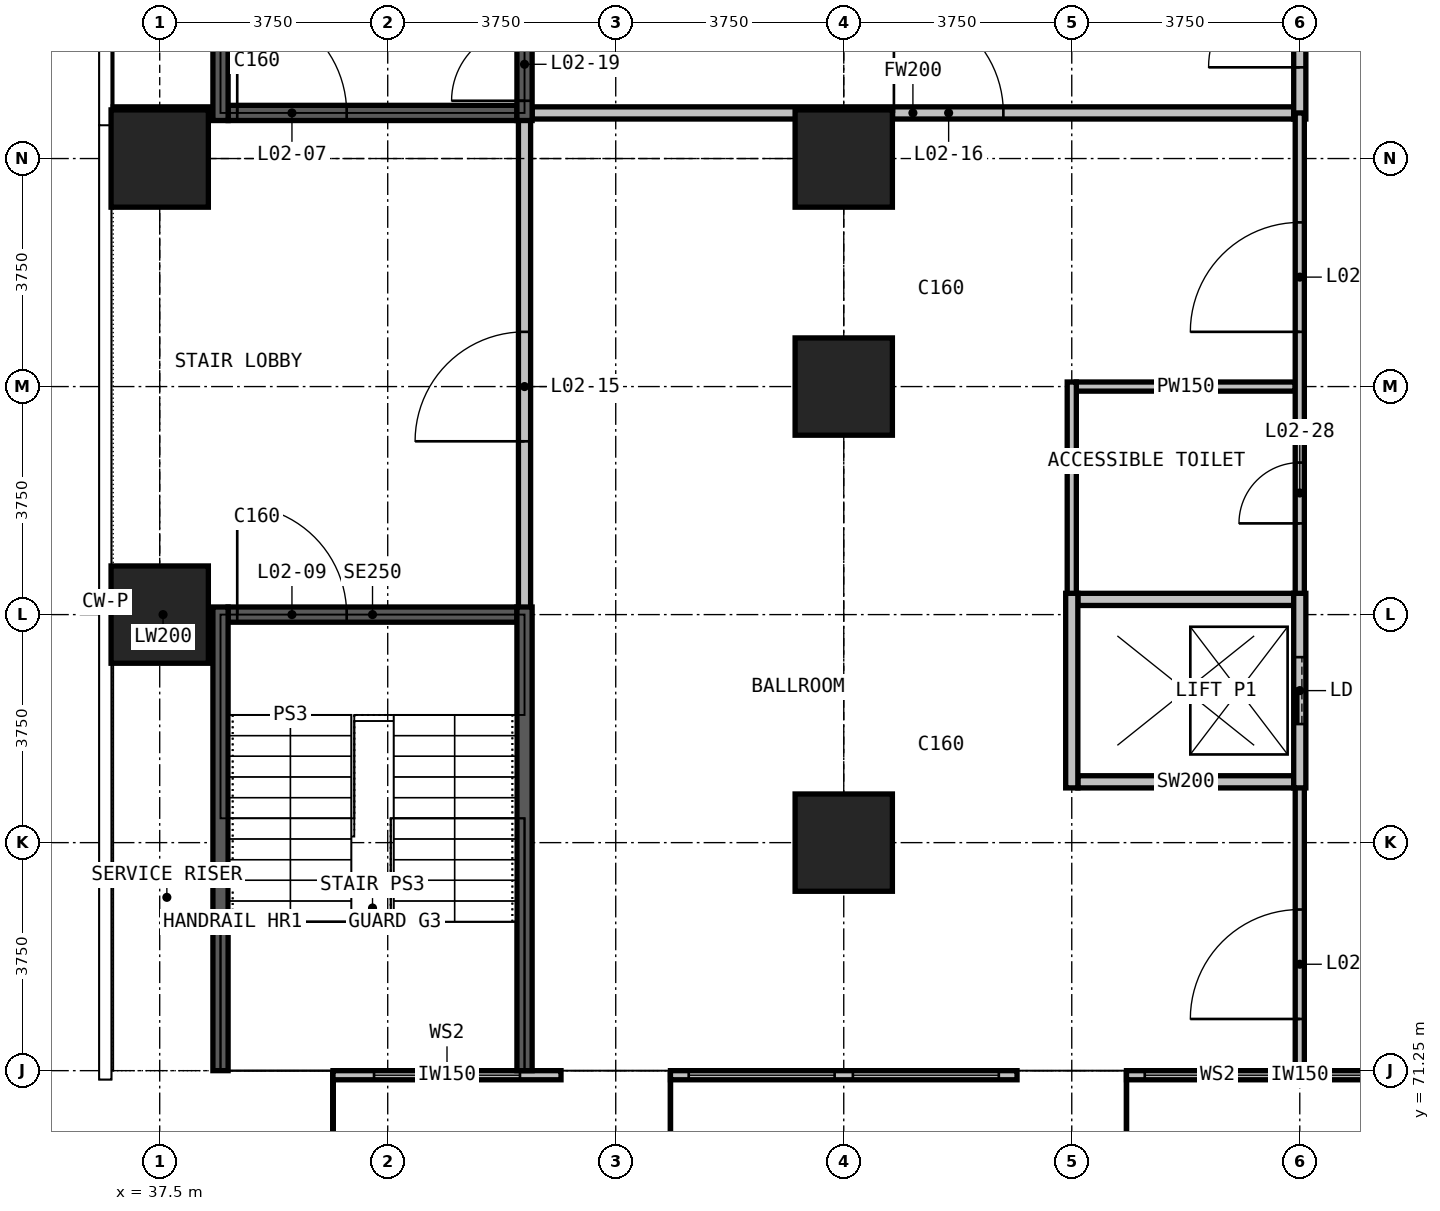
"""IFC4 building model, lengths in metres.
Left out: names, types, materials, properties, quantities, classifications, styles, units other than length and angle.
Written with IfcOpenShell. Run it as: python <this file> out.ifc"""

import sys

from ifc_helpers import new_model, si_unit, direction, frame, frame_2d, origin, origin_2d, place, context, subcontext, project, spatial, polyline, rectangle, outline, extrude, element, fill, save


model = new_model("IFC4")
c1 = context("Model", 3, precision=1e-05, world=origin(), true_north=direction((0.0, 1.0)))
c2 = subcontext(c1, "Body", "Model", "MODEL_VIEW")
j1 = project(units=[si_unit("LENGTHUNIT", "METRE"), si_unit("PLANEANGLEUNIT", "RADIAN")], contexts=[c1])
p1 = place(None, origin())
s1 = spatial("IfcSite", under=j1, at=p1, CompositionType="ELEMENT")
p2 = place(p1, origin())
s2 = spatial("IfcBuilding", under=s1, at=p2, CompositionType="ELEMENT")
p3 = place(p2, frame((0.0, 0.0, 16.5)))
s3 = spatial("IfcBuildingStorey", under=s2, at=p3, CompositionType="ELEMENT", Elevation=16.5)
p4 = place(p3, frame((40.35, 62.22, 0.0), z_axis=(1.0, 0.0, 0.0), x_axis=(0.0, 1.0, 0.0)))
e1 = element("IfcWall", 1, at=p4, inside=s3, PredefinedType="SHEAR", context=c2, shape_type="SweptSolid", body=[
    extrude(outline(polyline([(0.0, 0.0), (9.03, 0.0), (9.03, 7.5), (5.28, 7.5), (5.28, 7.15), (-17.22, 7.15), (-17.22, 7.5), (-20.97, 7.5), (-20.97, 0.0), (-11.941, 0.0), (-11.595, 0.488), (-10.658, 1.607), (-9.72, 2.522), (-8.783, 3.234), (-7.845, 3.743), (-6.908, 4.048), (-5.97, 4.15), (-5.033, 4.048), (-4.095, 3.743), (-3.158, 3.234), (-2.22, 2.522), (-1.283, 1.607), (-0.345, 0.488), (0.0, 0.0)])), origin(), (0.0, 0.0, -1.0), 3.75),
])
for number, where, z_axis, x_axis in (
    (2, (45.9, 62.22, 0.0), (1.0, 0.0, 0.0), (0.0, 1.0, 0.0)),
    (3, (53.4, 62.22, 0.0), (1.0, 0.0, 0.0), (0.0, 1.0, 0.0)),
):
    element("IfcWall", number, at=place(p3, frame(where, z_axis=z_axis, x_axis=x_axis)), inside=s3, PredefinedType="SHEAR", context=c2, shape_type="SweptSolid", body=[
        extrude(outline(polyline([(0.0, 0.0), (9.03, 0.0), (9.03, 7.5), (5.28, 7.5), (5.28, 7.15), (-17.22, 7.15), (-17.22, 7.5), (-20.97, 7.5), (-20.97, 0.0), (-11.941, 0.0), (-11.595, 0.488), (-10.658, 1.607), (-9.72, 2.522), (-8.783, 3.234), (-7.845, 3.743), (-6.908, 4.048), (-5.97, 4.15), (-5.033, 4.048), (-4.095, 3.743), (-3.158, 3.234), (-2.22, 2.522), (-1.283, 1.607), (-0.345, 0.488), (0.0, 0.0)])), origin(), (0.0, 0.0, -1.0), 1.8),
    ])
for number, where, z_axis, x_axis in (
    (4, (37.5, 78.75, 0.0), (0.0, 0.0, 1.0), (1.0, 0.0, 0.0)),
    (5, (37.5, 86.25, 0.0), (0.0, 0.0, 1.0), (1.0, 0.0, 0.0)),
    (6, (48.75, 75.0, 0.0), (0.0, 0.0, 1.0), (1.0, 0.0, 0.0)),
    (7, (48.75, 82.5, 0.0), (0.0, 0.0, 1.0), (1.0, 0.0, 0.0)),
    (8, (48.75, 86.25, 0.0), (0.0, 0.0, 1.0), (1.0, 0.0, 0.0)),
):
    element("IfcColumn", number, at=place(p3, frame(where, z_axis=z_axis, x_axis=x_axis)), inside=s3, PredefinedType="COLUMN", context=c2, shape_type="SweptSolid", body=[
        extrude(rectangle(XDim=1.6, YDim=1.6, at=origin_2d()), origin(), (0.0, 0.0, 1.0), 7.5),
    ])
p5 = place(p3, frame((40.35, 71.175, 0.0), z_axis=(0.0, 0.0, 1.0), x_axis=(1.0, 0.0, 0.0)))
e9 = element("IfcWall", 9, at=p5, inside=s3, PredefinedType="SOLIDWALL", context=c2, shape_type="SweptSolid", body=[
    extrude(rectangle(XDim=3.75, YDim=0.15, at=frame_2d((1.875, 0.0))), origin(), (0.0, 0.0, 1.0), 7.15),
])
p6 = place(p5, frame((0.675, 0.0, 0.9)))
e10 = element("IfcOpeningElement", 10, at=p6, cuts=e9, PredefinedType="OPENING", context=c2, shape_type="SweptSolid", body=[
    extrude(rectangle(XDim=2.4, YDim=3.6, at=frame_2d((1.2, 1.8))), frame((0.0, 0.085, 0.0), z_axis=(0.0, -1.0, 0.0), x_axis=(1.0, 0.0, 0.0)), (0.0, 0.0, 1.0), 0.17),
])
p7 = place(p3, frame((45.9, 71.175, 0.0), z_axis=(0.0, 0.0, 1.0), x_axis=(1.0, 0.0, 0.0)))
e11 = element("IfcWall", 11, at=p7, inside=s3, PredefinedType="SOLIDWALL", context=c2, shape_type="SweptSolid", body=[
    extrude(rectangle(XDim=5.7, YDim=0.15, at=frame_2d((2.85, 0.0))), origin(), (0.0, 0.0, 1.0), 7.15),
])
p8 = place(p7, frame((0.3, 0.0, 0.9)))
e12 = element("IfcOpeningElement", 12, at=p8, cuts=e11, PredefinedType="OPENING", context=c2, shape_type="SweptSolid", body=[
    extrude(rectangle(XDim=2.4, YDim=3.6, at=frame_2d((1.2, 1.8))), frame((0.0, 0.085, 0.0), z_axis=(0.0, -1.0, 0.0), x_axis=(1.0, 0.0, 0.0)), (0.0, 0.0, 1.0), 0.17),
])
p9 = place(p7, frame((3.0, 0.0, 0.9)))
e13 = element("IfcOpeningElement", 13, at=p9, cuts=e11, PredefinedType="OPENING", context=c2, shape_type="SweptSolid", body=[
    extrude(rectangle(XDim=2.4, YDim=3.6, at=frame_2d((1.2, 1.8))), frame((0.0, 0.085, 0.0), z_axis=(0.0, -1.0, 0.0), x_axis=(1.0, 0.0, 0.0)), (0.0, 0.0, 1.0), 0.17),
])
p10 = place(p3, frame((53.4, 71.175, 0.0), z_axis=(0.0, 0.0, 1.0), x_axis=(1.0, 0.0, 0.0)))
e14 = element("IfcWall", 14, at=p10, inside=s3, PredefinedType="SOLIDWALL", context=c2, shape_type="SweptSolid", body=[
    extrude(rectangle(XDim=5.7, YDim=0.15, at=frame_2d((2.85, 0.0))), origin(), (0.0, 0.0, 1.0), 7.15),
])
p11 = place(p10, frame((0.3, 0.0, 0.9)))
e15 = element("IfcOpeningElement", 15, at=p11, cuts=e14, PredefinedType="OPENING", context=c2, shape_type="SweptSolid", body=[
    extrude(rectangle(XDim=2.4, YDim=3.6, at=frame_2d((1.2, 1.8))), frame((0.0, 0.085, 0.0), z_axis=(0.0, -1.0, 0.0), x_axis=(1.0, 0.0, 0.0)), (0.0, 0.0, 1.0), 0.17),
])
p12 = place(p10, frame((3.0, 0.0, 0.9)))
e16 = element("IfcOpeningElement", 16, at=p12, cuts=e14, PredefinedType="OPENING", context=c2, shape_type="SweptSolid", body=[
    extrude(rectangle(XDim=2.4, YDim=3.6, at=frame_2d((1.2, 1.8))), frame((0.0, 0.085, 0.0), z_axis=(0.0, -1.0, 0.0), x_axis=(1.0, 0.0, 0.0)), (0.0, 0.0, 1.0), 0.17),
])
for number, where, z_axis, x_axis in (
    (17, (36.735, 78.75, 0.0), (0.0, 0.0, 1.0), (1.0, 0.0, 0.0)),
    (18, (36.735, 87.0, 0.0), (0.0, 0.0, 1.0), (1.0, 0.0, 0.0)),
):
    element("IfcWall", number, at=place(p3, frame(where, z_axis=z_axis, x_axis=x_axis)), inside=s3, PredefinedType="PARTITIONING", context=c2, shape_type="SweptSolid", body=[
        extrude(rectangle(XDim=1.64, YDim=0.2, at=frame_2d((0.82, 0.0))), origin(), (0.0, 0.0, 1.0), 7.15),
    ])
p13 = place(p3, frame((43.5, 78.625, 0.0), z_axis=(0.0, 0.0, 1.0), x_axis=(0.0, 1.0, 0.0)))
e19 = element("IfcWall", 19, at=p13, inside=s3, PredefinedType="PARTITIONING", context=c2, shape_type="SweptSolid", body=[
    extrude(rectangle(XDim=8.5, YDim=0.2, at=frame_2d((4.25, 0.0))), origin(), (0.0, 0.0, 1.0), 7.15),
])
p14 = place(p13, frame((2.975, 0.0, 0.0)))
e20 = element("IfcOpeningElement", 20, at=p14, cuts=e19, PredefinedType="OPENING", context=c2, shape_type="SweptSolid", body=[
    extrude(rectangle(XDim=1.8, YDim=2.2, at=frame_2d((0.9, 1.1))), frame((0.0, 0.11, 0.0), z_axis=(0.0, -1.0, 0.0), x_axis=(1.0, 0.0, 0.0)), (0.0, 0.0, 1.0), 0.22),
])
p15 = place(p3, frame((43.625, 87.0, 0.0), z_axis=(0.0, 0.0, 1.0), x_axis=(1.0, 0.0, 0.0)))
e21 = element("IfcWall", 21, at=p15, inside=s3, PredefinedType="PARTITIONING", context=c2, shape_type="SweptSolid", body=[
    extrude(rectangle(XDim=12.525, YDim=0.2, at=frame_2d((6.262, 0.0))), origin(), (0.0, 0.0, 1.0), 7.15),
])
p16 = place(p15, frame((5.95, 0.0, 0.0)))
e22 = element("IfcOpeningElement", 22, at=p16, cuts=e21, PredefinedType="OPENING", context=c2, shape_type="SweptSolid", body=[
    extrude(rectangle(XDim=1.8, YDim=2.2, at=frame_2d((0.9, 1.1))), frame((0.0, 0.11, 0.0), z_axis=(0.0, -1.0, 0.0), x_axis=(1.0, 0.0, 0.0)), (0.0, 0.0, 1.0), 0.22),
])
p17 = place(p3, frame((56.25, 86.9, 0.0), z_axis=(0.0, 0.0, 1.0), x_axis=(0.0, 1.0, 0.0)))
e23 = element("IfcWall", 23, at=p17, inside=s3, PredefinedType="PARTITIONING", context=c2, shape_type="SweptSolid", body=[
    extrude(rectangle(XDim=3.2, YDim=0.2, at=frame_2d((1.6, 0.0))), origin(), (0.0, 0.0, 1.0), 7.15),
])
p18 = place(p17, frame((0.85, 0.0, 0.0)))
e24 = element("IfcOpeningElement", 24, at=p18, cuts=e23, PredefinedType="OPENING", context=c2, shape_type="SweptSolid", body=[
    extrude(rectangle(XDim=1.5, YDim=2.2, at=frame_2d((0.75, 1.1))), frame((0.0, 0.11, 0.0), z_axis=(0.0, -1.0, 0.0), x_axis=(1.0, 0.0, 0.0)), (0.0, 0.0, 1.0), 0.22),
])
p19 = place(p3, frame((52.575, 82.5, 0.0), z_axis=(0.0, 0.0, 1.0), x_axis=(1.0, 0.0, 0.0)))
e25 = element("IfcWall", 25, at=p19, inside=s3, PredefinedType="PARTITIONING", context=c2, shape_type="SweptSolid", body=[
    extrude(rectangle(XDim=3.6, YDim=0.15, at=frame_2d((1.8, 0.0))), origin(), (0.0, 0.0, 1.0), 7.15),
])
p20 = place(p3, frame((52.5, 78.9, 0.0), z_axis=(0.0, 0.0, 1.0), x_axis=(0.0, 1.0, 0.0)))
e26 = element("IfcWall", 26, at=p20, inside=s3, PredefinedType="PARTITIONING", context=c2, shape_type="SweptSolid", body=[
    extrude(rectangle(XDim=3.675, YDim=0.15, at=frame_2d((1.837, 0.0))), origin(), (0.0, 0.0, 1.0), 7.15),
])
p21 = place(p3, frame((56.25, 71.25, 0.0), z_axis=(0.0, 0.0, 1.0), x_axis=(0.0, 1.0, 0.0)))
e27 = element("IfcWall", 27, at=p21, inside=s3, PredefinedType="PARTITIONING", context=c2, shape_type="SweptSolid", body=[
    extrude(rectangle(XDim=4.85, YDim=0.15, at=frame_2d((2.425, 0.0))), origin(), (0.0, 0.0, 1.0), 7.15),
])
p22 = place(p21, frame((0.85, 0.0, 0.0)))
e28 = element("IfcOpeningElement", 28, at=p22, cuts=e27, PredefinedType="OPENING", context=c2, shape_type="SweptSolid", body=[
    extrude(rectangle(XDim=1.8, YDim=2.2, at=frame_2d((0.9, 1.1))), frame((0.0, 0.085, 0.0), z_axis=(0.0, -1.0, 0.0), x_axis=(1.0, 0.0, 0.0)), (0.0, 0.0, 1.0), 0.17),
])
p23 = place(p3, frame((56.25, 78.9, 0.0), z_axis=(0.0, 0.0, 1.0), x_axis=(0.0, 1.0, 0.0)))
e29 = element("IfcWall", 29, at=p23, inside=s3, PredefinedType="PARTITIONING", context=c2, shape_type="SweptSolid", body=[
    extrude(rectangle(XDim=8.1, YDim=0.15, at=frame_2d((4.05, 0.0))), origin(), (0.0, 0.0, 1.0), 7.15),
])
p24 = place(p23, frame((4.5, 0.0, 0.0)))
e30 = element("IfcOpeningElement", 30, at=p24, cuts=e29, PredefinedType="OPENING", context=c2, shape_type="SweptSolid", body=[
    extrude(rectangle(XDim=1.8, YDim=2.2, at=frame_2d((0.9, 1.1))), frame((0.0, 0.085, 0.0), z_axis=(0.0, -1.0, 0.0), x_axis=(1.0, 0.0, 0.0)), (0.0, 0.0, 1.0), 0.17),
])
p25 = place(p23, frame((1.35, 0.0, 0.0)))
e31 = element("IfcOpeningElement", 31, at=p25, cuts=e29, PredefinedType="OPENING", context=c2, shape_type="SweptSolid", body=[
    extrude(rectangle(XDim=1.0, YDim=2.2, at=frame_2d((0.5, 1.1))), frame((0.0, 0.085, 0.0), z_axis=(0.0, -1.0, 0.0), x_axis=(1.0, 0.0, 0.0)), (0.0, 0.0, 1.0), 0.17),
])
for number, where, z_axis, x_axis in (
    (32, (52.6, 76.0, 0.0), (0.0, 0.0, 1.0), (1.0, 0.0, 0.0)),
    (33, (52.6, 79.0, 0.0), (0.0, 0.0, 1.0), (1.0, 0.0, 0.0)),
):
    element("IfcWall", number, at=place(p3, frame(where, z_axis=z_axis, x_axis=x_axis)), inside=s3, PredefinedType="PARTITIONING", context=c2, shape_type="SweptSolid", body=[
        extrude(rectangle(XDim=3.55, YDim=0.2, at=frame_2d((1.775, 0.0))), origin(), (0.0, 0.0, 1.0), 7.15),
    ])
p26 = place(p3, frame((52.5, 75.9, 0.0), z_axis=(0.0, 0.0, 1.0), x_axis=(0.0, 1.0, 0.0)))
e34 = element("IfcWall", 34, at=p26, inside=s3, PredefinedType="PARTITIONING", context=c2, shape_type="SweptSolid", body=[
    extrude(rectangle(XDim=3.2, YDim=0.2, at=frame_2d((1.6, 0.0))), origin(), (0.0, 0.0, 1.0), 7.15),
])
p27 = place(p3, frame((56.25, 75.9, 0.0), z_axis=(0.0, 0.0, 1.0), x_axis=(0.0, 1.0, 0.0)))
e35 = element("IfcWall", 35, at=p27, inside=s3, PredefinedType="PARTITIONING", context=c2, shape_type="SweptSolid", body=[
    extrude(rectangle(XDim=3.2, YDim=0.2, at=frame_2d((1.6, 0.0))), origin(), (0.0, 0.0, 1.0), 7.15),
])
p28 = place(p27, frame((1.05, 0.0, 0.0)))
e36 = element("IfcOpeningElement", 36, at=p28, cuts=e35, PredefinedType="OPENING", context=c2, shape_type="SweptSolid", body=[
    extrude(rectangle(XDim=1.1, YDim=2.2, at=frame_2d((0.55, 1.1))), frame((0.0, 0.11, 0.0), z_axis=(0.0, -1.0, 0.0), x_axis=(1.0, 0.0, 0.0)), (0.0, 0.0, 1.0), 0.22),
])
p29 = place(p3, frame((38.625, 78.75, 0.0), z_axis=(0.0, 0.0, 1.0), x_axis=(1.0, 0.0, 0.0)))
e37 = element("IfcWall", 37, at=p29, inside=s3, PredefinedType="PARTITIONING", context=c2, shape_type="SweptSolid", body=[
    extrude(rectangle(XDim=4.75, YDim=0.25, at=frame_2d((2.375, 0.0))), origin(), (0.0, 0.0, 1.0), 7.15),
])
p30 = place(p29, frame((0.15, 0.0, 0.0)))
e38 = element("IfcOpeningElement", 38, at=p30, cuts=e37, PredefinedType="OPENING", context=c2, shape_type="SweptSolid", body=[
    extrude(rectangle(XDim=1.8, YDim=2.2, at=frame_2d((0.9, 1.1))), frame((0.0, 0.135, 0.0), z_axis=(0.0, -1.0, 0.0), x_axis=(1.0, 0.0, 0.0)), (0.0, 0.0, 1.0), 0.27),
])
p31 = place(p3, frame((38.625, 87.0, 0.0), z_axis=(0.0, 0.0, 1.0), x_axis=(1.0, 0.0, 0.0)))
e39 = element("IfcWall", 39, at=p31, inside=s3, PredefinedType="PARTITIONING", context=c2, shape_type="SweptSolid", body=[
    extrude(rectangle(XDim=4.75, YDim=0.25, at=frame_2d((2.375, 0.0))), origin(), (0.0, 0.0, 1.0), 7.15),
])
p32 = place(p31, frame((0.15, 0.0, 0.0)))
e40 = element("IfcOpeningElement", 40, at=p32, cuts=e39, PredefinedType="OPENING", context=c2, shape_type="SweptSolid", body=[
    extrude(rectangle(XDim=1.8, YDim=2.2, at=frame_2d((0.9, 1.1))), frame((0.0, 0.135, 0.0), z_axis=(0.0, -1.0, 0.0), x_axis=(1.0, 0.0, 0.0)), (0.0, 0.0, 1.0), 0.27),
])
for number, where, z_axis, x_axis in (
    (41, (38.5, 71.25, 0.0), (0.0, 0.0, 1.0), (0.0, 1.0, 0.0)),
    (42, (38.5, 86.875, 0.0), (0.0, 0.0, 1.0), (0.0, 1.0, 0.0)),
    (43, (43.5, 71.25, 0.0), (0.0, 0.0, 1.0), (0.0, 1.0, 0.0)),
):
    element("IfcWall", number, at=place(p3, frame(where, z_axis=z_axis, x_axis=x_axis)), inside=s3, PredefinedType="PARTITIONING", context=c2, shape_type="SweptSolid", body=[
        extrude(rectangle(XDim=7.625, YDim=0.25, at=frame_2d((3.812, 0.0))), origin(), (0.0, 0.0, 1.0), 7.15),
    ])
p33 = place(p3, frame((43.5, 86.875, 0.0), z_axis=(0.0, 0.0, 1.0), x_axis=(0.0, 1.0, 0.0)))
e44 = element("IfcWall", 44, at=p33, inside=s3, PredefinedType="PARTITIONING", context=c2, shape_type="SweptSolid", body=[
    extrude(rectangle(XDim=7.625, YDim=0.25, at=frame_2d((3.812, 0.0))), origin(), (0.0, 0.0, 1.0), 7.15),
])
p34 = place(p33, frame((0.325, 0.0, 0.0)))
e45 = element("IfcOpeningElement", 45, at=p34, cuts=e44, PredefinedType="OPENING", context=c2, shape_type="SweptSolid", body=[
    extrude(rectangle(XDim=1.2, YDim=2.2, at=frame_2d((0.6, 1.1))), frame((0.0, 0.135, 0.0), z_axis=(0.0, -1.0, 0.0), x_axis=(1.0, 0.0, 0.0)), (0.0, 0.0, 1.0), 0.27),
])
p35 = place(p6, origin())
e46 = element("IfcWindow", 46, at=p35, inside=s3, PartitioningType="SINGLE_PANEL", PredefinedType="WINDOW", context=c2, shape_type="SweptSolid", body=[
    extrude(rectangle(XDim=2.4, YDim=3.6, at=frame_2d((1.2, 1.8))), frame((0.0, 0.03, 0.0), z_axis=(0.0, -1.0, 0.0), x_axis=(1.0, 0.0, 0.0)), (0.0, 0.0, 1.0), 0.06),
])
fill(e10, e46)
p36 = place(p8, origin())
e47 = element("IfcWindow", 47, at=p36, inside=s3, PartitioningType="SINGLE_PANEL", PredefinedType="WINDOW", context=c2, shape_type="SweptSolid", body=[
    extrude(rectangle(XDim=2.4, YDim=3.6, at=frame_2d((1.2, 1.8))), frame((0.0, 0.03, 0.0), z_axis=(0.0, -1.0, 0.0), x_axis=(1.0, 0.0, 0.0)), (0.0, 0.0, 1.0), 0.06),
])
fill(e12, e47)
p37 = place(p9, origin())
e48 = element("IfcWindow", 48, at=p37, inside=s3, PartitioningType="SINGLE_PANEL", PredefinedType="WINDOW", context=c2, shape_type="SweptSolid", body=[
    extrude(rectangle(XDim=2.4, YDim=3.6, at=frame_2d((1.2, 1.8))), frame((0.0, 0.03, 0.0), z_axis=(0.0, -1.0, 0.0), x_axis=(1.0, 0.0, 0.0)), (0.0, 0.0, 1.0), 0.06),
])
fill(e13, e48)
p38 = place(p11, origin())
e49 = element("IfcWindow", 49, at=p38, inside=s3, PartitioningType="SINGLE_PANEL", PredefinedType="WINDOW", context=c2, shape_type="SweptSolid", body=[
    extrude(rectangle(XDim=2.4, YDim=3.6, at=frame_2d((1.2, 1.8))), frame((0.0, 0.03, 0.0), z_axis=(0.0, -1.0, 0.0), x_axis=(1.0, 0.0, 0.0)), (0.0, 0.0, 1.0), 0.06),
])
fill(e15, e49)
p39 = place(p12, origin())
e50 = element("IfcWindow", 50, at=p39, inside=s3, PartitioningType="SINGLE_PANEL", PredefinedType="WINDOW", context=c2, shape_type="SweptSolid", body=[
    extrude(rectangle(XDim=2.4, YDim=3.6, at=frame_2d((1.2, 1.8))), frame((0.0, 0.03, 0.0), z_axis=(0.0, -1.0, 0.0), x_axis=(1.0, 0.0, 0.0)), (0.0, 0.0, 1.0), 0.06),
])
fill(e16, e50)
p40 = place(p18, origin())
e51 = element("IfcDoor", 51, at=p40, inside=s3, OperationType="DOUBLE_DOOR_SINGLE_SWING", PredefinedType="DOOR", context=c2, shape_type="SweptSolid", body=[
    extrude(rectangle(XDim=1.5, YDim=2.2, at=frame_2d((0.75, 1.1))), frame((0.0, 0.025, 0.0), z_axis=(0.0, -1.0, 0.0), x_axis=(1.0, 0.0, 0.0)), (0.0, 0.0, 1.0), 0.05),
])
fill(e24, e51)
p41 = place(p32, origin())
e52 = element("IfcDoor", 52, at=p41, inside=s3, OperationType="DOUBLE_DOOR_SINGLE_SWING", PredefinedType="DOOR", context=c2, shape_type="SweptSolid", body=[
    extrude(rectangle(XDim=1.8, YDim=2.2, at=frame_2d((0.9, 1.1))), frame((0.0, 0.025, 0.0), z_axis=(0.0, -1.0, 0.0), x_axis=(1.0, 0.0, 0.0)), (0.0, 0.0, 1.0), 0.05),
])
fill(e40, e52)
p42 = place(p30, origin())
e53 = element("IfcDoor", 53, at=p42, inside=s3, OperationType="DOUBLE_DOOR_SINGLE_SWING", PredefinedType="DOOR", context=c2, shape_type="SweptSolid", body=[
    extrude(rectangle(XDim=1.8, YDim=2.2, at=frame_2d((0.9, 1.1))), frame((0.0, 0.025, 0.0), z_axis=(0.0, -1.0, 0.0), x_axis=(1.0, 0.0, 0.0)), (0.0, 0.0, 1.0), 0.05),
])
fill(e38, e53)
p43 = place(p28, origin())
e54 = element("IfcDoor", 54, at=p43, inside=s3, OperationType="DOUBLE_DOOR_SLIDING", PredefinedType="DOOR", context=c2, shape_type="SweptSolid", body=[
    extrude(rectangle(XDim=1.1, YDim=2.2, at=frame_2d((0.55, 1.1))), frame((0.0, 0.025, 0.0), z_axis=(0.0, -1.0, 0.0), x_axis=(1.0, 0.0, 0.0)), (0.0, 0.0, 1.0), 0.05),
])
fill(e36, e54)
p44 = place(p22, origin())
e55 = element("IfcDoor", 55, at=p44, inside=s3, OperationType="DOUBLE_DOOR_SINGLE_SWING", PredefinedType="DOOR", context=c2, shape_type="SweptSolid", body=[
    extrude(rectangle(XDim=1.8, YDim=2.2, at=frame_2d((0.9, 1.1))), frame((0.0, 0.025, 0.0), z_axis=(0.0, -1.0, 0.0), x_axis=(1.0, 0.0, 0.0)), (0.0, 0.0, 1.0), 0.05),
])
fill(e28, e55)
p45 = place(p24, origin())
e56 = element("IfcDoor", 56, at=p45, inside=s3, OperationType="DOUBLE_DOOR_SINGLE_SWING", PredefinedType="DOOR", context=c2, shape_type="SweptSolid", body=[
    extrude(rectangle(XDim=1.8, YDim=2.2, at=frame_2d((0.9, 1.1))), frame((0.0, 0.025, 0.0), z_axis=(0.0, -1.0, 0.0), x_axis=(1.0, 0.0, 0.0)), (0.0, 0.0, 1.0), 0.05),
])
fill(e30, e56)
p46 = place(p14, origin())
e57 = element("IfcDoor", 57, at=p46, inside=s3, OperationType="DOUBLE_DOOR_SINGLE_SWING", PredefinedType="DOOR", context=c2, shape_type="SweptSolid", body=[
    extrude(rectangle(XDim=1.8, YDim=2.2, at=frame_2d((0.9, 1.1))), frame((0.0, 0.025, 0.0), z_axis=(0.0, -1.0, 0.0), x_axis=(1.0, 0.0, 0.0)), (0.0, 0.0, 1.0), 0.05),
])
fill(e20, e57)
p47 = place(p16, origin())
e58 = element("IfcDoor", 58, at=p47, inside=s3, OperationType="DOUBLE_DOOR_SINGLE_SWING", PredefinedType="DOOR", context=c2, shape_type="SweptSolid", body=[
    extrude(rectangle(XDim=1.8, YDim=2.2, at=frame_2d((0.9, 1.1))), frame((0.0, 0.025, 0.0), z_axis=(0.0, -1.0, 0.0), x_axis=(1.0, 0.0, 0.0)), (0.0, 0.0, 1.0), 0.05),
])
fill(e22, e58)
p48 = place(p34, origin())
e59 = element("IfcDoor", 59, at=p48, inside=s3, OperationType="SINGLE_SWING_RIGHT", PredefinedType="DOOR", context=c2, shape_type="SweptSolid", body=[
    extrude(rectangle(XDim=1.2, YDim=2.2, at=frame_2d((0.6, 1.1))), frame((0.0, 0.025, 0.0), z_axis=(0.0, -1.0, 0.0), x_axis=(1.0, 0.0, 0.0)), (0.0, 0.0, 1.0), 0.05),
])
fill(e45, e59)
p49 = place(p25, origin())
e60 = element("IfcDoor", 60, at=p49, inside=s3, OperationType="SINGLE_SWING_RIGHT", PredefinedType="DOOR", context=c2, shape_type="SweptSolid", body=[
    extrude(rectangle(XDim=1.0, YDim=2.2, at=frame_2d((0.5, 1.1))), frame((0.0, 0.025, 0.0), z_axis=(0.0, -1.0, 0.0), x_axis=(1.0, 0.0, 0.0)), (0.0, 0.0, 1.0), 0.05),
])
fill(e31, e60)
save(model, sys.argv[1])
